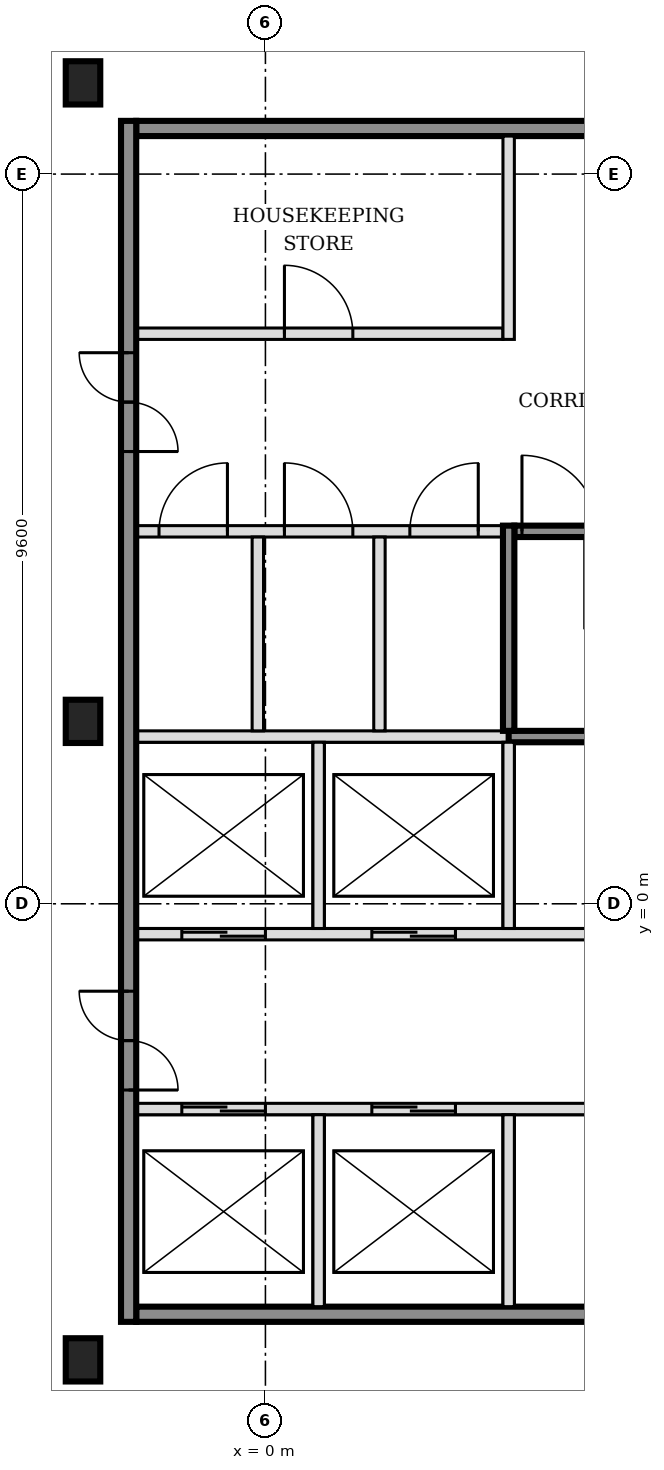
"""IFC4 building model, lengths in metres.
Left out: names, types, materials, properties, quantities, classifications, styles, units other than length and angle.
Written with IfcOpenShell. Run it as: python <this file> out.ifc"""

import sys

from ifc_helpers import new_model, si_unit, direction, frame, frame_2d, origin, origin_2d, place, context, subcontext, project, spatial, rectangle, i_section, extrude, element, fill, save


model = new_model("IFC4")
c1 = context("Model", 3, precision=1e-05, world=origin(), true_north=direction((0.0, 1.0)))
c2 = subcontext(c1, "Body", "Model", "MODEL_VIEW")
j1 = project(units=[si_unit("LENGTHUNIT", "METRE"), si_unit("PLANEANGLEUNIT", "RADIAN")], contexts=[c1])
p1 = place(None, origin())
s1 = spatial("IfcSite", under=j1, at=p1, CompositionType="ELEMENT")
p2 = place(p1, origin())
s2 = spatial("IfcBuilding", under=s1, at=p2, CompositionType="ELEMENT")
p3 = place(p2, frame((0.0, 0.0, 47.4)))
s3 = spatial("IfcBuildingStorey", under=s2, at=p3, CompositionType="ELEMENT", Elevation=47.4)
for number, where, z_axis, x_axis in (
    (1, (-2.4, -6.0, -0.15), (0.0, 0.0, 1.0), (1.0, 0.0, 0.0)),
    (2, (-2.4, 2.4, -0.15), (0.0, 0.0, 1.0), (1.0, 0.0, 0.0)),
    (3, (-2.4, 10.8, -0.15), (0.0, 0.0, 1.0), (1.0, 0.0, 0.0)),
):
    element("IfcColumn", number, at=place(p3, frame(where, z_axis=z_axis, x_axis=x_axis)), inside=s3, PredefinedType="COLUMN", context=c2, shape_type="SweptSolid", body=[
        extrude(i_section(OverallWidth=0.454, OverallDepth=0.569, WebThickness=0.078, FlangeThickness=0.125, FilletRadius=0.015, at=origin_2d()), origin(), (0.0, 0.0, 1.0), 3.6),
    ])
p4 = place(p3, frame((-1.7, -5.4, 0.0), z_axis=(0.0, 0.0, 1.0), x_axis=(1.0, 0.0, 0.0)))
e4 = element("IfcWall", 4, at=p4, inside=s3, PredefinedType="SOLIDWALL", context=c2, shape_type="SweptSolid", body=[
    extrude(rectangle(XDim=7.9, YDim=0.2, at=frame_2d((3.95, 0.0))), origin(), (0.0, 0.0, 1.0), 3.45),
])
p5 = place(p3, frame((-1.7, -2.7, 0.0), z_axis=(0.0, 0.0, 1.0), x_axis=(1.0, 0.0, 0.0)))
e5 = element("IfcWall", 5, at=p5, inside=s3, PredefinedType="SOLIDWALL", context=c2, shape_type="SweptSolid", body=[
    extrude(rectangle(XDim=7.9, YDim=0.15, at=frame_2d((3.95, 0.0))), origin(), (0.0, 0.0, 1.0), 3.45),
])
p6 = place(p5, frame((0.6, 0.0, 0.0)))
e6 = element("IfcOpeningElement", 6, at=p6, cuts=e5, PredefinedType="OPENING", context=c2, shape_type="SweptSolid", body=[
    extrude(rectangle(XDim=1.1, YDim=2.1, at=frame_2d((0.55, 1.05))), frame((0.0, 0.085, 0.0), z_axis=(0.0, -1.0, 0.0), x_axis=(1.0, 0.0, 0.0)), (0.0, 0.0, 1.0), 0.17),
])
p7 = place(p5, frame((3.1, 0.0, 0.0)))
e7 = element("IfcOpeningElement", 7, at=p7, cuts=e5, PredefinedType="OPENING", context=c2, shape_type="SweptSolid", body=[
    extrude(rectangle(XDim=1.1, YDim=2.1, at=frame_2d((0.55, 1.05))), frame((0.0, 0.085, 0.0), z_axis=(0.0, -1.0, 0.0), x_axis=(1.0, 0.0, 0.0)), (0.0, 0.0, 1.0), 0.17),
])
p8 = place(p3, frame((-1.7, -0.4, 0.0), z_axis=(0.0, 0.0, 1.0), x_axis=(1.0, 0.0, 0.0)))
e8 = element("IfcWall", 8, at=p8, inside=s3, PredefinedType="SOLIDWALL", context=c2, shape_type="SweptSolid", body=[
    extrude(rectangle(XDim=15.925, YDim=0.15, at=frame_2d((7.962, 0.0))), origin(), (0.0, 0.0, 1.0), 3.45),
])
p9 = place(p8, frame((0.6, 0.0, 0.0)))
e9 = element("IfcOpeningElement", 9, at=p9, cuts=e8, PredefinedType="OPENING", context=c2, shape_type="SweptSolid", body=[
    extrude(rectangle(XDim=1.1, YDim=2.1, at=frame_2d((0.55, 1.05))), frame((0.0, 0.085, 0.0), z_axis=(0.0, -1.0, 0.0), x_axis=(1.0, 0.0, 0.0)), (0.0, 0.0, 1.0), 0.17),
])
p10 = place(p8, frame((3.1, 0.0, 0.0)))
e10 = element("IfcOpeningElement", 10, at=p10, cuts=e8, PredefinedType="OPENING", context=c2, shape_type="SweptSolid", body=[
    extrude(rectangle(XDim=1.1, YDim=2.1, at=frame_2d((0.55, 1.05))), frame((0.0, 0.085, 0.0), z_axis=(0.0, -1.0, 0.0), x_axis=(1.0, 0.0, 0.0)), (0.0, 0.0, 1.0), 0.17),
])
p11 = place(p8, frame((11.575, 0.0, 0.0)))
e11 = element("IfcOpeningElement", 11, at=p11, cuts=e8, PredefinedType="OPENING", context=c2, shape_type="SweptSolid", body=[
    extrude(rectangle(XDim=1.2, YDim=2.1, at=frame_2d((0.6, 1.05))), frame((0.0, 0.085, 0.0), z_axis=(0.0, -1.0, 0.0), x_axis=(1.0, 0.0, 0.0)), (0.0, 0.0, 1.0), 0.17),
])
p12 = place(p8, frame((14.125, 0.0, 0.0)))
e12 = element("IfcOpeningElement", 12, at=p12, cuts=e8, PredefinedType="OPENING", context=c2, shape_type="SweptSolid", body=[
    extrude(rectangle(XDim=1.2, YDim=2.1, at=frame_2d((0.6, 1.05))), frame((0.0, 0.085, 0.0), z_axis=(0.0, -1.0, 0.0), x_axis=(1.0, 0.0, 0.0)), (0.0, 0.0, 1.0), 0.17),
])
p13 = place(p3, frame((-1.7, 2.2, 0.0), z_axis=(0.0, 0.0, 1.0), x_axis=(1.0, 0.0, 0.0)))
e13 = element("IfcWall", 13, at=p13, inside=s3, PredefinedType="SOLIDWALL", context=c2, shape_type="SweptSolid", body=[
    extrude(rectangle(XDim=4.9, YDim=0.15, at=frame_2d((2.45, 0.0))), origin(), (0.0, 0.0, 1.0), 3.45),
])
p14 = place(p3, frame((3.2, 2.2, 0.0), z_axis=(0.0, 0.0, 1.0), x_axis=(1.0, 0.0, 0.0)))
e14 = element("IfcWall", 14, at=p14, inside=s3, PredefinedType="SOLIDWALL", context=c2, shape_type="SweptSolid", body=[
    extrude(rectangle(XDim=6.5, YDim=0.15, at=frame_2d((3.25, 0.0))), origin(), (0.0, 0.0, 1.0), 3.45),
])
p15 = place(p3, frame((-1.7, 4.9, 0.0), z_axis=(0.0, 0.0, 1.0), x_axis=(1.0, 0.0, 0.0)))
e15 = element("IfcWall", 15, at=p15, inside=s3, PredefinedType="PARTITIONING", context=c2, shape_type="SweptSolid", body=[
    extrude(rectangle(XDim=4.825, YDim=0.15, at=frame_2d((2.413, 0.0))), origin(), (0.0, 0.0, 1.0), 3.45),
])
p16 = place(p15, frame((0.3, 0.0, 0.0)))
e16 = element("IfcOpeningElement", 16, at=p16, cuts=e15, PredefinedType="OPENING", context=c2, shape_type="SweptSolid", body=[
    extrude(rectangle(XDim=0.9, YDim=2.1, at=frame_2d((0.45, 1.05))), frame((0.0, 0.085, 0.0), z_axis=(0.0, -1.0, 0.0), x_axis=(1.0, 0.0, 0.0)), (0.0, 0.0, 1.0), 0.17),
])
p17 = place(p15, frame((1.95, 0.0, 0.0)))
e17 = element("IfcOpeningElement", 17, at=p17, cuts=e15, PredefinedType="OPENING", context=c2, shape_type="SweptSolid", body=[
    extrude(rectangle(XDim=0.9, YDim=2.1, at=frame_2d((0.45, 1.05))), frame((0.0, 0.085, 0.0), z_axis=(0.0, -1.0, 0.0), x_axis=(1.0, 0.0, 0.0)), (0.0, 0.0, 1.0), 0.17),
])
p18 = place(p15, frame((3.6, 0.0, 0.0)))
e18 = element("IfcOpeningElement", 18, at=p18, cuts=e15, PredefinedType="OPENING", context=c2, shape_type="SweptSolid", body=[
    extrude(rectangle(XDim=0.9, YDim=2.1, at=frame_2d((0.45, 1.05))), frame((0.0, 0.085, 0.0), z_axis=(0.0, -1.0, 0.0), x_axis=(1.0, 0.0, 0.0)), (0.0, 0.0, 1.0), 0.17),
])
p19 = place(p3, frame((3.275, 4.9, 0.0), z_axis=(0.0, 0.0, 1.0), x_axis=(1.0, 0.0, 0.0)))
e19 = element("IfcWall", 19, at=p19, inside=s3, PredefinedType="SOLIDWALL", context=c2, shape_type="SweptSolid", body=[
    extrude(rectangle(XDim=6.425, YDim=0.15, at=frame_2d((3.212, 0.0))), origin(), (0.0, 0.0, 1.0), 3.45),
])
p20 = place(p19, frame((0.1, 0.0, 0.0)))
e20 = element("IfcOpeningElement", 20, at=p20, cuts=e19, PredefinedType="OPENING", context=c2, shape_type="SweptSolid", body=[
    extrude(rectangle(XDim=1.0, YDim=2.1, at=frame_2d((0.5, 1.05))), frame((0.0, 0.085, 0.0), z_axis=(0.0, -1.0, 0.0), x_axis=(1.0, 0.0, 0.0)), (0.0, 0.0, 1.0), 0.17),
])
p21 = place(p3, frame((-1.7, 7.5, 0.0), z_axis=(0.0, 0.0, 1.0), x_axis=(1.0, 0.0, 0.0)))
e21 = element("IfcWall", 21, at=p21, inside=s3, PredefinedType="PARTITIONING", context=c2, shape_type="SweptSolid", body=[
    extrude(rectangle(XDim=4.825, YDim=0.15, at=frame_2d((2.413, 0.0))), origin(), (0.0, 0.0, 1.0), 3.45),
])
p22 = place(p21, frame((1.95, 0.0, 0.0)))
e22 = element("IfcOpeningElement", 22, at=p22, cuts=e21, PredefinedType="OPENING", context=c2, shape_type="SweptSolid", body=[
    extrude(rectangle(XDim=0.9, YDim=2.1, at=frame_2d((0.45, 1.05))), frame((0.0, 0.085, 0.0), z_axis=(0.0, -1.0, 0.0), x_axis=(1.0, 0.0, 0.0)), (0.0, 0.0, 1.0), 0.17),
])
p23 = place(p3, frame((-1.7, 10.2, 0.0), z_axis=(0.0, 0.0, 1.0), x_axis=(1.0, 0.0, 0.0)))
e23 = element("IfcWall", 23, at=p23, inside=s3, PredefinedType="SOLIDWALL", context=c2, shape_type="SweptSolid", body=[
    extrude(rectangle(XDim=7.9, YDim=0.2, at=frame_2d((3.95, 0.0))), origin(), (0.0, 0.0, 1.0), 3.45),
])
p24 = place(p3, frame((-1.8, -5.5, 0.0), z_axis=(0.0, 0.0, 1.0), x_axis=(0.0, 1.0, 0.0)))
e24 = element("IfcWall", 24, at=p24, inside=s3, PredefinedType="SOLIDWALL", context=c2, shape_type="SweptSolid", body=[
    extrude(rectangle(XDim=15.8, YDim=0.2, at=frame_2d((7.9, 0.0))), origin(), (0.0, 0.0, 1.0), 3.45),
])
p25 = place(p24, frame((3.05, 0.0, 0.0)))
e25 = element("IfcOpeningElement", 25, at=p25, cuts=e24, PredefinedType="OPENING", context=c2, shape_type="SweptSolid", body=[
    extrude(rectangle(XDim=1.3, YDim=2.1, at=frame_2d((0.65, 1.05))), frame((0.0, 0.11, 0.0), z_axis=(0.0, -1.0, 0.0), x_axis=(1.0, 0.0, 0.0)), (0.0, 0.0, 1.0), 0.22),
])
p26 = place(p24, frame((11.45, 0.0, 0.0)))
e26 = element("IfcOpeningElement", 26, at=p26, cuts=e24, PredefinedType="OPENING", context=c2, shape_type="SweptSolid", body=[
    extrude(rectangle(XDim=1.3, YDim=2.1, at=frame_2d((0.65, 1.05))), frame((0.0, 0.11, 0.0), z_axis=(0.0, -1.0, 0.0), x_axis=(1.0, 0.0, 0.0)), (0.0, 0.0, 1.0), 0.22),
])
p27 = place(p3, frame((-0.1, 2.275, 0.0), z_axis=(0.0, 0.0, 1.0), x_axis=(0.0, 1.0, 0.0)))
e27 = element("IfcWall", 27, at=p27, inside=s3, PredefinedType="PARTITIONING", context=c2, shape_type="SweptSolid", body=[
    extrude(rectangle(XDim=2.55, YDim=0.15, at=frame_2d((1.275, 0.0))), origin(), (0.0, 0.0, 1.0), 3.45),
])
p28 = place(p3, frame((0.7, -5.3, 0.0), z_axis=(0.0, 0.0, 1.0), x_axis=(0.0, 1.0, 0.0)))
e28 = element("IfcWall", 28, at=p28, inside=s3, PredefinedType="SOLIDWALL", context=c2, shape_type="SweptSolid", body=[
    extrude(rectangle(XDim=2.525, YDim=0.15, at=frame_2d((1.263, 0.0))), origin(), (0.0, 0.0, 1.0), 3.45),
])
p29 = place(p3, frame((0.7, -0.325, 0.0), z_axis=(0.0, 0.0, 1.0), x_axis=(0.0, 1.0, 0.0)))
e29 = element("IfcWall", 29, at=p29, inside=s3, PredefinedType="SOLIDWALL", context=c2, shape_type="SweptSolid", body=[
    extrude(rectangle(XDim=2.45, YDim=0.15, at=frame_2d((1.225, 0.0))), origin(), (0.0, 0.0, 1.0), 3.45),
])
p30 = place(p3, frame((1.5, 2.275, 0.0), z_axis=(0.0, 0.0, 1.0), x_axis=(0.0, 1.0, 0.0)))
e30 = element("IfcWall", 30, at=p30, inside=s3, PredefinedType="PARTITIONING", context=c2, shape_type="SweptSolid", body=[
    extrude(rectangle(XDim=2.55, YDim=0.15, at=frame_2d((1.275, 0.0))), origin(), (0.0, 0.0, 1.0), 3.45),
])
p31 = place(p3, frame((3.2, -5.3, 0.0), z_axis=(0.0, 0.0, 1.0), x_axis=(0.0, 1.0, 0.0)))
e31 = element("IfcWall", 31, at=p31, inside=s3, PredefinedType="SOLIDWALL", context=c2, shape_type="SweptSolid", body=[
    extrude(rectangle(XDim=2.525, YDim=0.15, at=frame_2d((1.263, 0.0))), origin(), (0.0, 0.0, 1.0), 3.45),
])
p32 = place(p3, frame((3.2, -0.325, 0.0), z_axis=(0.0, 0.0, 1.0), x_axis=(0.0, 1.0, 0.0)))
e32 = element("IfcWall", 32, at=p32, inside=s3, PredefinedType="SOLIDWALL", context=c2, shape_type="SweptSolid", body=[
    extrude(rectangle(XDim=2.45, YDim=0.15, at=frame_2d((1.225, 0.0))), origin(), (0.0, 0.0, 1.0), 3.45),
])
p33 = place(p3, frame((3.2, 2.275, 0.0), z_axis=(0.0, 0.0, 1.0), x_axis=(0.0, 1.0, 0.0)))
e33 = element("IfcWall", 33, at=p33, inside=s3, PredefinedType="SOLIDWALL", context=c2, shape_type="SweptSolid", body=[
    extrude(rectangle(XDim=2.7, YDim=0.15, at=frame_2d((1.35, 0.0))), origin(), (0.0, 0.0, 1.0), 3.45),
])
p34 = place(p3, frame((3.2, 7.425, 0.0), z_axis=(0.0, 0.0, 1.0), x_axis=(0.0, 1.0, 0.0)))
e34 = element("IfcWall", 34, at=p34, inside=s3, PredefinedType="PARTITIONING", context=c2, shape_type="SweptSolid", body=[
    extrude(rectangle(XDim=2.675, YDim=0.15, at=frame_2d((1.337, 0.0))), origin(), (0.0, 0.0, 1.0), 3.45),
])
p35 = place(p6, origin())
e35 = element("IfcDoor", 35, at=p35, inside=s3, OperationType="DOUBLE_DOOR_SLIDING", PredefinedType="DOOR", context=c2, shape_type="SweptSolid", body=[
    extrude(rectangle(XDim=1.1, YDim=2.1, at=frame_2d((0.55, 1.05))), frame((0.0, 0.025, 0.0), z_axis=(0.0, -1.0, 0.0), x_axis=(1.0, 0.0, 0.0)), (0.0, 0.0, 1.0), 0.05),
])
fill(e6, e35)
p36 = place(p7, origin())
e36 = element("IfcDoor", 36, at=p36, inside=s3, OperationType="DOUBLE_DOOR_SLIDING", PredefinedType="DOOR", context=c2, shape_type="SweptSolid", body=[
    extrude(rectangle(XDim=1.1, YDim=2.1, at=frame_2d((0.55, 1.05))), frame((0.0, 0.025, 0.0), z_axis=(0.0, -1.0, 0.0), x_axis=(1.0, 0.0, 0.0)), (0.0, 0.0, 1.0), 0.05),
])
fill(e7, e36)
p37 = place(p9, origin())
e37 = element("IfcDoor", 37, at=p37, inside=s3, OperationType="DOUBLE_DOOR_SLIDING", PredefinedType="DOOR", context=c2, shape_type="SweptSolid", body=[
    extrude(rectangle(XDim=1.1, YDim=2.1, at=frame_2d((0.55, 1.05))), frame((0.0, 0.025, 0.0), z_axis=(0.0, -1.0, 0.0), x_axis=(1.0, 0.0, 0.0)), (0.0, 0.0, 1.0), 0.05),
])
fill(e9, e37)
p38 = place(p10, origin())
e38 = element("IfcDoor", 38, at=p38, inside=s3, OperationType="DOUBLE_DOOR_SLIDING", PredefinedType="DOOR", context=c2, shape_type="SweptSolid", body=[
    extrude(rectangle(XDim=1.1, YDim=2.1, at=frame_2d((0.55, 1.05))), frame((0.0, 0.025, 0.0), z_axis=(0.0, -1.0, 0.0), x_axis=(1.0, 0.0, 0.0)), (0.0, 0.0, 1.0), 0.05),
])
fill(e10, e38)
p39 = place(p20, origin())
e39 = element("IfcDoor", 39, at=p39, inside=s3, OperationType="SINGLE_SWING_LEFT", PredefinedType="DOOR", context=c2, shape_type="SweptSolid", body=[
    extrude(rectangle(XDim=1.0, YDim=2.1, at=frame_2d((0.5, 1.05))), frame((0.0, 0.025, 0.0), z_axis=(0.0, -1.0, 0.0), x_axis=(1.0, 0.0, 0.0)), (0.0, 0.0, 1.0), 0.05),
])
fill(e20, e39)
p40 = place(p25, origin())
e40 = element("IfcDoor", 40, at=p40, inside=s3, OperationType="DOUBLE_DOOR_SINGLE_SWING", PredefinedType="DOOR", context=c2, shape_type="SweptSolid", body=[
    extrude(rectangle(XDim=1.3, YDim=2.1, at=frame_2d((0.65, 1.05))), frame((0.0, 0.025, 0.0), z_axis=(0.0, -1.0, 0.0), x_axis=(1.0, 0.0, 0.0)), (0.0, 0.0, 1.0), 0.05),
])
fill(e25, e40)
p41 = place(p26, origin())
e41 = element("IfcDoor", 41, at=p41, inside=s3, OperationType="DOUBLE_DOOR_SINGLE_SWING", PredefinedType="DOOR", context=c2, shape_type="SweptSolid", body=[
    extrude(rectangle(XDim=1.3, YDim=2.1, at=frame_2d((0.65, 1.05))), frame((0.0, 0.025, 0.0), z_axis=(0.0, -1.0, 0.0), x_axis=(1.0, 0.0, 0.0)), (0.0, 0.0, 1.0), 0.05),
])
fill(e26, e41)
p42 = place(p16, origin())
e42 = element("IfcDoor", 42, at=p42, inside=s3, OperationType="SINGLE_SWING_RIGHT", PredefinedType="DOOR", context=c2, shape_type="SweptSolid", body=[
    extrude(rectangle(XDim=0.9, YDim=2.1, at=frame_2d((0.45, 1.05))), frame((0.0, 0.025, 0.0), z_axis=(0.0, -1.0, 0.0), x_axis=(1.0, 0.0, 0.0)), (0.0, 0.0, 1.0), 0.05),
])
fill(e16, e42)
p43 = place(p17, origin())
e43 = element("IfcDoor", 43, at=p43, inside=s3, OperationType="SINGLE_SWING_LEFT", PredefinedType="DOOR", context=c2, shape_type="SweptSolid", body=[
    extrude(rectangle(XDim=0.9, YDim=2.1, at=frame_2d((0.45, 1.05))), frame((0.0, 0.025, 0.0), z_axis=(0.0, -1.0, 0.0), x_axis=(1.0, 0.0, 0.0)), (0.0, 0.0, 1.0), 0.05),
])
fill(e17, e43)
p44 = place(p18, origin())
e44 = element("IfcDoor", 44, at=p44, inside=s3, OperationType="SINGLE_SWING_RIGHT", PredefinedType="DOOR", context=c2, shape_type="SweptSolid", body=[
    extrude(rectangle(XDim=0.9, YDim=2.1, at=frame_2d((0.45, 1.05))), frame((0.0, 0.025, 0.0), z_axis=(0.0, -1.0, 0.0), x_axis=(1.0, 0.0, 0.0)), (0.0, 0.0, 1.0), 0.05),
])
fill(e18, e44)
p45 = place(p22, origin())
e45 = element("IfcDoor", 45, at=p45, inside=s3, OperationType="SINGLE_SWING_LEFT", PredefinedType="DOOR", context=c2, shape_type="SweptSolid", body=[
    extrude(rectangle(XDim=0.9, YDim=2.1, at=frame_2d((0.45, 1.05))), frame((0.0, 0.025, 0.0), z_axis=(0.0, -1.0, 0.0), x_axis=(1.0, 0.0, 0.0)), (0.0, 0.0, 1.0), 0.05),
])
fill(e22, e45)
save(model, sys.argv[1])
